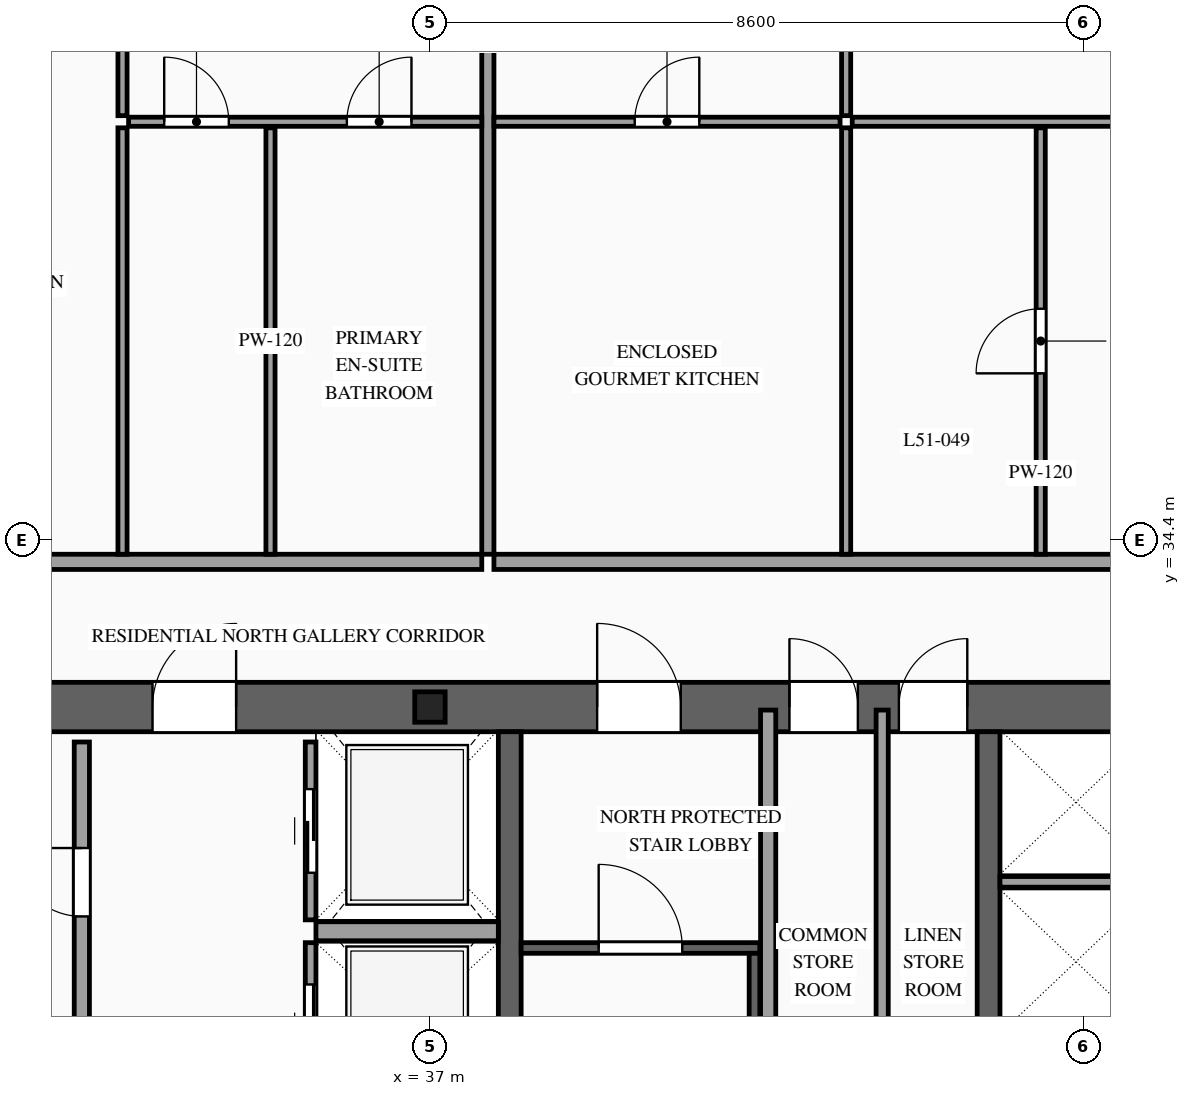
"""IFC4 building model, lengths in metres.
Left out: names, types, materials, properties, quantities, classifications, styles, units other than length and angle.
Written with IfcOpenShell. Run it as: python <this file> out.ifc"""

import sys

from ifc_helpers import new_model, si_unit, direction, frame, frame_2d, origin, origin_2d, place, context, subcontext, project, spatial, rectangle, i_section, extrude, source, transform, mapped, element, fill, save


model = new_model("IFC4")
c1 = context("Model", 3, precision=1e-05, world=origin(), true_north=direction((0.0, 1.0)))
c2 = subcontext(c1, "Body", "Model", "MODEL_VIEW")
j1 = project(units=[si_unit("LENGTHUNIT", "METRE"), si_unit("PLANEANGLEUNIT", "RADIAN")], contexts=[c1])
p1 = place(None, origin())
s1 = spatial("IfcSite", under=j1, at=p1, CompositionType="ELEMENT")
p2 = place(p1, origin())
s2 = spatial("IfcBuilding", under=s1, at=p2, CompositionType="ELEMENT")
p3 = place(p2, frame((0.0, 0.0, 195.0)))
s3 = spatial("IfcBuildingStorey", under=s2, at=p3, CompositionType="ELEMENT", Elevation=195.0)
p4 = place(p3, frame((23.475, 32.2, 0.0), z_axis=(0.0, 0.0, 1.0), x_axis=(1.0, 0.0, 0.0)))
e1 = element("IfcWall", 1, at=p4, inside=s3, PredefinedType="SHEAR", context=c2, shape_type="SweptSolid", body=[
    extrude(rectangle(XDim=27.05, YDim=0.65, at=frame_2d((13.525, 0.0))), origin(), (0.0, 0.0, 1.0), 3.5),
])
p5 = place(p4, frame((4.595, 0.0, 0.0)))
e2 = element("IfcOpeningElement", 2, at=p5, cuts=e1, PredefinedType="OPENING", context=c2, shape_type="SweptSolid", body=[
    extrude(rectangle(XDim=0.9, YDim=2.15, at=frame_2d((0.45, 1.075))), frame((0.0, 0.34, 0.0), z_axis=(0.0, -1.0, 0.0), x_axis=(1.0, 0.0, 0.0)), (0.0, 0.0, 1.0), 0.68),
])
p6 = place(p4, frame((9.875, 0.0, 0.0)))
e3 = element("IfcOpeningElement", 3, at=p6, cuts=e1, PredefinedType="OPENING", context=c2, shape_type="SweptSolid", body=[
    extrude(rectangle(XDim=1.1, YDim=2.2, at=frame_2d((0.55, 1.1))), frame((0.0, 0.34, 0.0), z_axis=(0.0, -1.0, 0.0), x_axis=(1.0, 0.0, 0.0)), (0.0, 0.0, 1.0), 0.68),
])
p7 = place(p4, frame((15.725, 0.0, 0.0)))
e4 = element("IfcOpeningElement", 4, at=p7, cuts=e1, PredefinedType="OPENING", context=c2, shape_type="SweptSolid", body=[
    extrude(rectangle(XDim=1.1, YDim=2.2, at=frame_2d((0.55, 1.1))), frame((0.0, 0.34, 0.0), z_axis=(0.0, -1.0, 0.0), x_axis=(1.0, 0.0, 0.0)), (0.0, 0.0, 1.0), 0.68),
])
p8 = place(p4, frame((18.255, 0.0, 0.0)))
e5 = element("IfcOpeningElement", 5, at=p8, cuts=e1, PredefinedType="OPENING", context=c2, shape_type="SweptSolid", body=[
    extrude(rectangle(XDim=0.9, YDim=2.15, at=frame_2d((0.45, 1.075))), frame((0.0, 0.34, 0.0), z_axis=(0.0, -1.0, 0.0), x_axis=(1.0, 0.0, 0.0)), (0.0, 0.0, 1.0), 0.68),
])
p9 = place(p4, frame((19.695, 0.0, 0.0)))
e6 = element("IfcOpeningElement", 6, at=p9, cuts=e1, PredefinedType="OPENING", context=c2, shape_type="SweptSolid", body=[
    extrude(rectangle(XDim=0.9, YDim=2.15, at=frame_2d((0.45, 1.075))), frame((0.0, 0.34, 0.0), z_axis=(0.0, -1.0, 0.0), x_axis=(1.0, 0.0, 0.0)), (0.0, 0.0, 1.0), 0.68),
])
m1 = source(origin(), c2, "Body", "SweptSolid", [
    extrude(rectangle(XDim=12.15, YDim=0.3, at=frame_2d((6.075, 0.0))), origin(), (0.0, 0.0, 1.0), 3.5),
])
for number, where, z_axis, x_axis in (
    (7, (38.05, 19.725, 0.0), (0.0, 0.0, 1.0), (0.0, 1.0, 0.0)),
    (8, (44.35, 19.725, 0.0), (0.0, 0.0, 1.0), (0.0, 1.0, 0.0)),
):
    element("IfcWall", number, at=place(p3, frame(where, z_axis=z_axis, x_axis=x_axis)), inside=s3, PredefinedType="SOLIDWALL", context=c2, shape_type="MappedRepresentation", body=[
        mapped(m1, transform((0.0, 0.0, 0.0), scale=1.0)),
    ])
m2 = source(origin(), c2, "Body", "SweptSolid", [
    extrude(i_section(OverallWidth=0.4, OverallDepth=0.4, WebThickness=0.013, FlangeThickness=0.021, at=origin_2d()), origin(), (0.0, 0.0, 1.0), 3.5),
])
p10 = place(p3, frame((37.0, 32.2, 0.0), z_axis=(0.0, 0.0, 1.0), x_axis=(1.0, 0.0, 0.0)))
e9 = element("IfcColumn", 9, at=p10, inside=s3, PredefinedType="COLUMN", context=c2, shape_type="MappedRepresentation", body=[
    mapped(m2, transform((0.0, 0.0, 0.0), scale=1.0)),
])
p11 = place(p3, frame((35.43, 26.9, 0.0), z_axis=(0.0, 0.0, 1.0), x_axis=(0.0, 1.0, 0.0)))
e10 = element("IfcWall", 10, at=p11, inside=s3, PredefinedType="SOLIDWALL", context=c2, shape_type="SweptSolid", body=[
    extrude(rectangle(XDim=2.2, YDim=0.14, at=frame_2d((1.1, 0.0))), origin(), (0.0, 0.0, 1.0), 3.28),
])
p12 = place(p11, frame((0.55, 0.0, 0.0)))
e11 = element("IfcOpeningElement", 11, at=p12, cuts=e10, PredefinedType="OPENING", context=c2, shape_type="SweptSolid", body=[
    extrude(rectangle(XDim=1.1, YDim=2.2, at=frame_2d((0.55, 1.1))), frame((0.0, 0.085, 0.0), z_axis=(0.0, -1.0, 0.0), x_axis=(1.0, 0.0, 0.0)), (0.0, 0.0, 1.0), 0.17),
])
p13 = place(p3, frame((35.43, 29.4, 0.0), z_axis=(0.0, 0.0, 1.0), x_axis=(0.0, 1.0, 0.0)))
e12 = element("IfcWall", 12, at=p13, inside=s3, PredefinedType="SOLIDWALL", context=c2, shape_type="SweptSolid", body=[
    extrude(rectangle(XDim=2.34, YDim=0.14, at=frame_2d((1.17, 0.0))), origin(), (0.0, 0.0, 1.0), 3.28),
])
p14 = place(p13, frame((0.62, 0.0, 0.0)))
e13 = element("IfcOpeningElement", 13, at=p14, cuts=e12, PredefinedType="OPENING", context=c2, shape_type="SweptSolid", body=[
    extrude(rectangle(XDim=1.1, YDim=2.2, at=frame_2d((0.55, 1.1))), frame((0.0, 0.085, 0.0), z_axis=(0.0, -1.0, 0.0), x_axis=(1.0, 0.0, 0.0)), (0.0, 0.0, 1.0), 0.17),
])
m3 = source(origin(), c2, "Body", "SweptSolid", [
    extrude(rectangle(XDim=2.4, YDim=0.25, at=frame_2d((1.2, 0.0))), origin(), (0.0, 0.0, 1.0), 3.28),
])
p15 = place(p3, frame((35.5, 29.25, 0.0), z_axis=(0.0, 0.0, 1.0), x_axis=(1.0, 0.0, 0.0)))
e14 = element("IfcWall", 14, at=p15, inside=s3, PredefinedType="SOLIDWALL", context=c2, shape_type="MappedRepresentation", body=[
    mapped(m3, transform((0.0, 0.0, 0.0), scale=1.0)),
])
m4 = source(origin(), c2, "Body", "SweptSolid", [
    extrude(rectangle(XDim=2.0, YDim=0.14, at=frame_2d((1.0, 0.0))), origin(), (0.0, 0.0, 1.0), 3.28),
])
p16 = place(p3, frame((44.5, 29.9, 0.0), z_axis=(0.0, 0.0, 1.0), x_axis=(1.0, 0.0, 0.0)))
e15 = element("IfcWall", 15, at=p16, inside=s3, PredefinedType="SOLIDWALL", context=c2, shape_type="MappedRepresentation", body=[
    mapped(m4, transform((0.0, 0.0, 0.0), scale=1.0)),
])
p17 = place(p3, frame((38.2, 29.03, 0.0), z_axis=(0.0, 0.0, 1.0), x_axis=(1.0, 0.0, 0.0)))
e16 = element("IfcWall", 16, at=p17, inside=s3, PredefinedType="SOLIDWALL", context=c2, shape_type="SweptSolid", body=[
    extrude(rectangle(XDim=3.14, YDim=0.14, at=frame_2d((1.57, 0.0))), origin(), (0.0, 0.0, 1.0), 3.28),
])
p18 = place(p17, frame((1.02, 0.0, 0.0)))
e17 = element("IfcOpeningElement", 17, at=p18, cuts=e16, PredefinedType="OPENING", context=c2, shape_type="SweptSolid", body=[
    extrude(rectangle(XDim=1.1, YDim=2.2, at=frame_2d((0.55, 1.1))), frame((0.0, 0.085, 0.0), z_axis=(0.0, -1.0, 0.0), x_axis=(1.0, 0.0, 0.0)), (0.0, 0.0, 1.0), 0.17),
])
m5 = source(origin(), c2, "Body", "SweptSolid", [
    extrude(rectangle(XDim=8.94, YDim=0.14, at=frame_2d((4.47, 0.0))), origin(), (0.0, 0.0, 1.0), 3.28),
])
p19 = place(p3, frame((41.27, 20.02, 0.0), z_axis=(0.0, 0.0, 1.0), x_axis=(0.0, 1.0, 0.0)))
e18 = element("IfcWall", 18, at=p19, inside=s3, PredefinedType="SOLIDWALL", context=c2, shape_type="MappedRepresentation", body=[
    mapped(m5, transform((0.0, 0.0, 0.0), scale=1.0)),
])
p20 = place(p3, frame((32.42, 28.05, 0.0), z_axis=(0.0, 0.0, 1.0), x_axis=(0.0, 1.0, 0.0)))
e19 = element("IfcWall", 19, at=p20, inside=s3, PredefinedType="PARTITIONING", context=c2, shape_type="SweptSolid", body=[
    extrude(rectangle(XDim=3.69, YDim=0.2, at=frame_2d((1.845, 0.0))), origin(), (0.0, 0.0, 1.0), 3.28),
])
p21 = place(p20, frame((1.395, 0.0, 0.0)))
e20 = element("IfcOpeningElement", 20, at=p21, cuts=e19, PredefinedType="OPENING", context=c2, shape_type="SweptSolid", body=[
    extrude(rectangle(XDim=0.9, YDim=2.15, at=frame_2d((0.45, 1.075))), frame((0.0, 0.115, 0.0), z_axis=(0.0, -1.0, 0.0), x_axis=(1.0, 0.0, 0.0)), (0.0, 0.0, 1.0), 0.23),
])
m6 = source(origin(), c2, "Body", "SweptSolid", [
    extrude(rectangle(XDim=5.96, YDim=0.2, at=frame_2d((2.98, 0.0))), origin(), (0.0, 0.0, 1.0), 3.28),
])
p22 = place(p3, frame((41.45, 26.2, 0.0), z_axis=(0.0, 0.0, 1.0), x_axis=(0.0, 1.0, 0.0)))
e21 = element("IfcWall", 21, at=p22, inside=s3, PredefinedType="PARTITIONING", context=c2, shape_type="MappedRepresentation", body=[
    mapped(m6, transform((0.0, 0.0, 0.0), scale=1.0)),
])
m7 = source(origin(), c2, "Body", "SweptSolid", [
    extrude(rectangle(XDim=5.96, YDim=0.16, at=frame_2d((2.98, 0.0))), origin(), (0.0, 0.0, 1.0), 3.28),
])
p23 = place(p3, frame((42.95, 26.2, 0.0), z_axis=(0.0, 0.0, 1.0), x_axis=(0.0, 1.0, 0.0)))
e22 = element("IfcWall", 22, at=p23, inside=s3, PredefinedType="PARTITIONING", context=c2, shape_type="MappedRepresentation", body=[
    mapped(m7, transform((0.0, 0.0, 0.0), scale=1.0)),
])
p24 = place(p3, frame((17.94, 34.11, 0.0), z_axis=(0.0, 0.0, 1.0), x_axis=(1.0, 0.0, 0.0)))
e23 = element("IfcWall", 23, at=p24, inside=s3, PredefinedType="PARTITIONING", context=c2, shape_type="SweptSolid", body=[
    extrude(rectangle(XDim=19.742, YDim=0.2, at=frame_2d((9.871, 0.0))), origin(), (0.0, 0.0, 1.0), 3.28),
])
p25 = place(p24, frame((11.915, 0.0, 0.0)))
e24 = element("IfcOpeningElement", 24, at=p25, cuts=e23, PredefinedType="OPENING", context=c2, shape_type="SweptSolid", body=[
    extrude(rectangle(XDim=1.0, YDim=2.2, at=frame_2d((0.5, 1.1))), frame((0.0, 0.115, 0.0), z_axis=(0.0, -1.0, 0.0), x_axis=(1.0, 0.0, 0.0)), (0.0, 0.0, 1.0), 0.23),
])
m8 = source(origin(), c2, "Body", "SweptSolid", [
    extrude(rectangle(XDim=13.54, YDim=0.16, at=frame_2d((6.77, 0.0))), origin(), (0.0, 0.0, 1.0), 3.28),
])
p26 = place(p3, frame((37.762, 34.21, 0.0), z_axis=(0.0, 0.0, 1.0), x_axis=(0.0, 1.0, 0.0)))
e25 = element("IfcWall", 25, at=p26, inside=s3, PredefinedType="PARTITIONING", context=c2, shape_type="MappedRepresentation", body=[
    mapped(m8, transform((0.0, 0.0, 0.0), scale=1.0)),
])
m9 = source(origin(), c2, "Body", "SweptSolid", [
    extrude(rectangle(XDim=5.61, YDim=0.12, at=frame_2d((2.805, 0.0))), origin(), (0.0, 0.0, 1.0), 3.28),
])
for number, where, z_axis, x_axis in (
    (26, (34.902, 34.21, 0.0), (0.0, 0.0, 1.0), (0.0, 1.0, 0.0)),
    (27, (32.955, 34.21, 0.0), (0.0, 0.0, 1.0), (0.0, 1.0, 0.0)),
):
    element("IfcWall", number, at=place(p3, frame(where, z_axis=z_axis, x_axis=x_axis)), inside=s3, PredefinedType="PARTITIONING", context=c2, shape_type="MappedRepresentation", body=[
        mapped(m9, transform((0.0, 0.0, 0.0), scale=1.0)),
    ])
p27 = place(p3, frame((33.035, 39.9, 0.0), z_axis=(0.0, 0.0, 1.0), x_axis=(1.0, 0.0, 0.0)))
e28 = element("IfcWall", 28, at=p27, inside=s3, PredefinedType="PARTITIONING", context=c2, shape_type="SweptSolid", body=[
    extrude(rectangle(XDim=4.647, YDim=0.12, at=frame_2d((2.323, 0.0))), origin(), (0.0, 0.0, 1.0), 2.875),
])
p28 = place(p27, frame((2.872, 0.0, 0.0)))
e29 = element("IfcOpeningElement", 29, at=p28, cuts=e28, PredefinedType="OPENING", context=c2, shape_type="SweptSolid", body=[
    extrude(rectangle(XDim=0.85, YDim=2.1, at=frame_2d((0.425, 1.05))), frame((0.0, 0.075, 0.0), z_axis=(0.0, -1.0, 0.0), x_axis=(1.0, 0.0, 0.0)), (0.0, 0.0, 1.0), 0.15),
])
p29 = place(p27, frame((0.469, 0.0, 0.0)))
e30 = element("IfcOpeningElement", 30, at=p29, cuts=e28, PredefinedType="OPENING", context=c2, shape_type="SweptSolid", body=[
    extrude(rectangle(XDim=0.85, YDim=2.1, at=frame_2d((0.425, 1.05))), frame((0.0, 0.075, 0.0), z_axis=(0.0, -1.0, 0.0), x_axis=(1.0, 0.0, 0.0)), (0.0, 0.0, 1.0), 0.15),
])
p30 = place(p3, frame((32.955, 39.98, 0.0), z_axis=(0.0, 0.0, 1.0), x_axis=(0.0, 1.0, 0.0)))
e31 = element("IfcWall", 31, at=p30, inside=s3, PredefinedType="PARTITIONING", context=c2, shape_type="SweptSolid", body=[
    extrude(rectangle(XDim=7.77, YDim=0.12, at=frame_2d((3.885, 0.0))), origin(), (0.0, 0.0, 1.0), 3.28),
])
p31 = place(p30, frame((3.435, 0.0, 0.0)))
e32 = element("IfcOpeningElement", 32, at=p31, cuts=e31, PredefinedType="OPENING", context=c2, shape_type="SweptSolid", body=[
    extrude(rectangle(XDim=0.9, YDim=2.15, at=frame_2d((0.45, 1.075))), frame((0.0, 0.075, 0.0), z_axis=(0.0, -1.0, 0.0), x_axis=(1.0, 0.0, 0.0)), (0.0, 0.0, 1.0), 0.15),
])
p32 = place(p3, frame((37.842, 34.11, 0.0), z_axis=(0.0, 0.0, 1.0), x_axis=(1.0, 0.0, 0.0)))
e33 = element("IfcWall", 33, at=p32, inside=s3, PredefinedType="PARTITIONING", context=c2, shape_type="SweptSolid", body=[
    extrude(rectangle(XDim=18.218, YDim=0.2, at=frame_2d((9.109, 0.0))), origin(), (0.0, 0.0, 1.0), 3.28),
])
p33 = place(p32, frame((10.556, 0.0, 0.0)))
e34 = element("IfcOpeningElement", 34, at=p33, cuts=e33, PredefinedType="OPENING", context=c2, shape_type="SweptSolid", body=[
    extrude(rectangle(XDim=1.0, YDim=2.2, at=frame_2d((0.5, 1.1))), frame((0.0, 0.115, 0.0), z_axis=(0.0, -1.0, 0.0), x_axis=(1.0, 0.0, 0.0)), (0.0, 0.0, 1.0), 0.23),
])
p34 = place(p3, frame((37.842, 39.9, 0.0), z_axis=(0.0, 0.0, 1.0), x_axis=(1.0, 0.0, 0.0)))
e35 = element("IfcWall", 35, at=p34, inside=s3, PredefinedType="PARTITIONING", context=c2, shape_type="SweptSolid", body=[
    extrude(rectangle(XDim=4.554, YDim=0.12, at=frame_2d((2.277, 0.0))), origin(), (0.0, 0.0, 1.0), 2.875),
])
p35 = place(p34, frame((1.852, 0.0, 0.0)))
e36 = element("IfcOpeningElement", 36, at=p35, cuts=e35, PredefinedType="OPENING", context=c2, shape_type="SweptSolid", body=[
    extrude(rectangle(XDim=0.85, YDim=2.1, at=frame_2d((0.425, 1.05))), frame((0.0, 0.075, 0.0), z_axis=(0.0, -1.0, 0.0), x_axis=(1.0, 0.0, 0.0)), (0.0, 0.0, 1.0), 0.15),
])
p36 = place(p3, frame((42.476, 34.21, 0.0), z_axis=(0.0, 0.0, 1.0), x_axis=(0.0, 1.0, 0.0)))
e37 = element("IfcWall", 37, at=p36, inside=s3, PredefinedType="PARTITIONING", context=c2, shape_type="MappedRepresentation", body=[
    mapped(m9, transform((0.0, 0.0, 0.0), scale=1.0)),
])
p37 = place(p3, frame((45.036, 34.21, 0.0), z_axis=(0.0, 0.0, 1.0), x_axis=(0.0, 1.0, 0.0)))
e38 = element("IfcWall", 38, at=p37, inside=s3, PredefinedType="PARTITIONING", context=c2, shape_type="SweptSolid", body=[
    extrude(rectangle(XDim=5.61, YDim=0.12, at=frame_2d((2.805, 0.0))), origin(), (0.0, 0.0, 1.0), 3.28),
])
p38 = place(p37, frame((2.38, 0.0, 0.0)))
e39 = element("IfcOpeningElement", 39, at=p38, cuts=e38, PredefinedType="OPENING", context=c2, shape_type="SweptSolid", body=[
    extrude(rectangle(XDim=0.85, YDim=2.1, at=frame_2d((0.425, 1.05))), frame((0.0, 0.075, 0.0), z_axis=(0.0, -1.0, 0.0), x_axis=(1.0, 0.0, 0.0)), (0.0, 0.0, 1.0), 0.15),
])
p39 = place(p3, frame((42.476, 39.98, 0.0), z_axis=(0.0, 0.0, 1.0), x_axis=(0.0, 1.0, 0.0)))
e40 = element("IfcWall", 40, at=p39, inside=s3, PredefinedType="PARTITIONING", context=c2, shape_type="SweptSolid", body=[
    extrude(rectangle(XDim=7.77, YDim=0.12, at=frame_2d((3.885, 0.0))), origin(), (0.0, 0.0, 1.0), 3.28),
])
p40 = place(p39, frame((3.435, 0.0, 0.0)))
e41 = element("IfcOpeningElement", 41, at=p40, cuts=e40, PredefinedType="OPENING", context=c2, shape_type="SweptSolid", body=[
    extrude(rectangle(XDim=0.9, YDim=2.15, at=frame_2d((0.45, 1.075))), frame((0.0, 0.075, 0.0), z_axis=(0.0, -1.0, 0.0), x_axis=(1.0, 0.0, 0.0)), (0.0, 0.0, 1.0), 0.15),
])
m10 = source(origin(), c2, "Body", "SweptSolid", [
    extrude(rectangle(XDim=3.827, YDim=0.12, at=frame_2d((1.914, 0.0))), origin(), (0.0, 0.0, 1.0), 2.875),
])
p41 = place(p3, frame((42.556, 39.9, 0.0), z_axis=(0.0, 0.0, 1.0), x_axis=(1.0, 0.0, 0.0)))
e42 = element("IfcWall", 42, at=p41, inside=s3, PredefinedType="PARTITIONING", context=c2, shape_type="MappedRepresentation", body=[
    mapped(m10, transform((0.0, 0.0, 0.0), scale=1.0)),
])
m11 = source(origin(), c2, "Body", "SweptSolid", [
    extrude(rectangle(XDim=1.1, YDim=2.2, at=frame_2d((0.55, 1.1))), frame((0.0, 0.025, 0.0), z_axis=(0.0, -1.0, 0.0), x_axis=(1.0, 0.0, 0.0)), (0.0, 0.0, 1.0), 0.05),
])
p42 = place(p12, origin())
e43 = element("IfcDoor", 43, at=p42, inside=s3, OperationType="SLIDING_TO_LEFT", PredefinedType="DOOR", context=c2, shape_type="MappedRepresentation", body=[
    mapped(m11, transform((0.0, 0.0, 0.0), scale=1.0)),
])
fill(e11, e43)
p43 = place(p14, origin())
e44 = element("IfcDoor", 44, at=p43, inside=s3, OperationType="SLIDING_TO_RIGHT", PredefinedType="DOOR", context=c2, shape_type="MappedRepresentation", body=[
    mapped(m11, transform((0.0, 0.0, 0.0), scale=1.0)),
])
fill(e13, e44)
m12 = source(origin(), c2, "Body", "SweptSolid", [
    extrude(rectangle(XDim=1.1, YDim=2.2, at=frame_2d((0.55, 1.1))), frame((0.0, 0.025, 0.0), z_axis=(0.0, -1.0, 0.0), x_axis=(1.0, 0.0, 0.0)), (0.0, 0.0, 1.0), 0.05),
])
p44 = place(p18, origin())
e45 = element("IfcDoor", 45, at=p44, inside=s3, OperationType="SINGLE_SWING_LEFT", PredefinedType="DOOR", context=c2, shape_type="MappedRepresentation", body=[
    mapped(m12, transform((0.0, 0.0, 0.0), scale=1.0)),
])
fill(e17, e45)
p45 = place(p6, origin())
e46 = element("IfcDoor", 46, at=p45, inside=s3, OperationType="SINGLE_SWING_RIGHT", PredefinedType="DOOR", context=c2, shape_type="MappedRepresentation", body=[
    mapped(m12, transform((0.0, 0.0, 0.0), scale=1.0)),
])
fill(e3, e46)
p46 = place(p7, origin())
e47 = element("IfcDoor", 47, at=p46, inside=s3, OperationType="SINGLE_SWING_LEFT", PredefinedType="DOOR", context=c2, shape_type="MappedRepresentation", body=[
    mapped(m12, transform((0.0, 0.0, 0.0), scale=1.0)),
])
fill(e4, e47)
m13 = source(origin(), c2, "Body", "SweptSolid", [
    extrude(rectangle(XDim=0.9, YDim=2.15, at=frame_2d((0.45, 1.075))), frame((0.0, 0.025, 0.0), z_axis=(0.0, -1.0, 0.0), x_axis=(1.0, 0.0, 0.0)), (0.0, 0.0, 1.0), 0.05),
])
p47 = place(p21, origin())
e48 = element("IfcDoor", 48, at=p47, inside=s3, OperationType="SINGLE_SWING_RIGHT", PredefinedType="DOOR", context=c2, shape_type="MappedRepresentation", body=[
    mapped(m13, transform((0.0, 0.0, 0.0), scale=1.0)),
])
fill(e20, e48)
p48 = place(p8, origin())
e49 = element("IfcDoor", 49, at=p48, inside=s3, OperationType="SINGLE_SWING_LEFT", PredefinedType="DOOR", context=c2, shape_type="MappedRepresentation", body=[
    mapped(m13, transform((0.0, 0.0, 0.0), scale=1.0)),
])
fill(e5, e49)
p49 = place(p9, origin())
e50 = element("IfcDoor", 50, at=p49, inside=s3, OperationType="SINGLE_SWING_RIGHT", PredefinedType="DOOR", context=c2, shape_type="MappedRepresentation", body=[
    mapped(m13, transform((0.0, 0.0, 0.0), scale=1.0)),
])
fill(e6, e50)
m14 = source(origin(), c2, "Body", "SweptSolid", [
    extrude(rectangle(XDim=0.85, YDim=2.1, at=frame_2d((0.425, 1.05))), frame((0.0, 0.025, 0.0), z_axis=(0.0, -1.0, 0.0), x_axis=(1.0, 0.0, 0.0)), (0.0, 0.0, 1.0), 0.05),
])
p50 = place(p28, origin())
e51 = element("IfcDoor", 51, at=p50, inside=s3, OperationType="SINGLE_SWING_RIGHT", PredefinedType="DOOR", context=c2, shape_type="MappedRepresentation", body=[
    mapped(m14, transform((0.0, 0.0, 0.0), scale=1.0)),
])
fill(e29, e51)
p51 = place(p29, origin())
e52 = element("IfcDoor", 52, at=p51, inside=s3, OperationType="SINGLE_SWING_LEFT", PredefinedType="DOOR", context=c2, shape_type="MappedRepresentation", body=[
    mapped(m14, transform((0.0, 0.0, 0.0), scale=1.0)),
])
fill(e30, e52)
p52 = place(p35, origin())
e53 = element("IfcDoor", 53, at=p52, inside=s3, OperationType="SINGLE_SWING_RIGHT", PredefinedType="DOOR", context=c2, shape_type="MappedRepresentation", body=[
    mapped(m14, transform((0.0, 0.0, 0.0), scale=1.0)),
])
fill(e36, e53)
p53 = place(p38, origin())
e54 = element("IfcDoor", 54, at=p53, inside=s3, OperationType="SINGLE_SWING_LEFT", PredefinedType="DOOR", context=c2, shape_type="MappedRepresentation", body=[
    mapped(m14, transform((0.0, 0.0, 0.0), scale=1.0)),
])
fill(e39, e54)
save(model, sys.argv[1])
